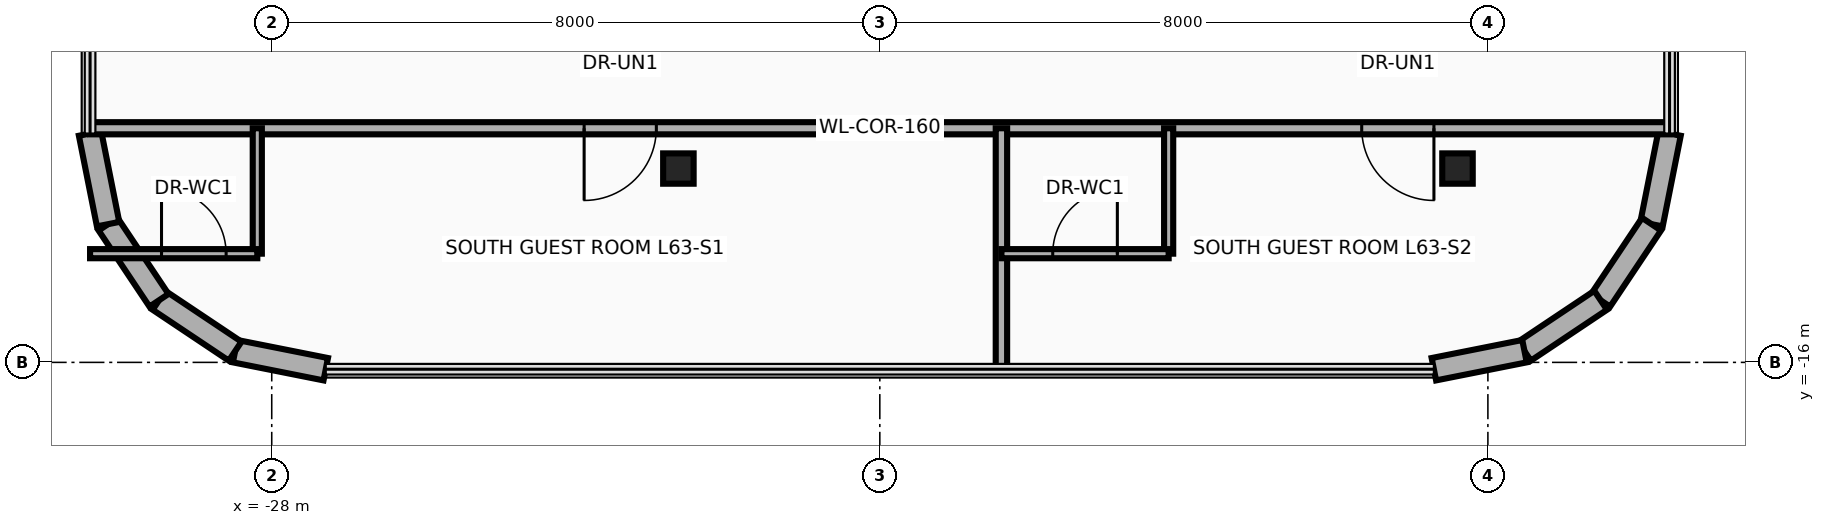
"""IFC4 building model, lengths in metres.
Left out: names, types, materials, properties, quantities, classifications, styles, units other than length and angle.
Written with IfcOpenShell. Run it as: python <this file> out.ifc"""

import sys

from ifc_helpers import new_model, si_unit, direction, frame, frame_2d, origin, origin_2d, place, context, subcontext, project, spatial, rectangle, i_section, extrude, source, transform, mapped, element, fill, save


model = new_model("IFC4")
c1 = context("Model", 3, precision=1e-05, world=origin(), true_north=direction((0.0, 1.0)))
c2 = subcontext(c1, "Body", "Model", "MODEL_VIEW")
j1 = project(units=[si_unit("LENGTHUNIT", "METRE"), si_unit("PLANEANGLEUNIT", "RADIAN")], contexts=[c1])
p1 = place(None, origin())
s1 = spatial("IfcSite", under=j1, at=p1, CompositionType="ELEMENT")
p2 = place(p1, origin())
s2 = spatial("IfcBuilding", under=s1, at=p2, CompositionType="ELEMENT")
p3 = place(p2, frame((0.0, 0.0, 244.0)))
s3 = spatial("IfcBuildingStorey", under=s2, at=p3, CompositionType="ELEMENT", Elevation=244.0)
m1 = source(origin(), c2, "Body", "SweptSolid", [
    extrude(i_section(OverallWidth=0.401, OverallDepth=0.399, WebThickness=0.025, FlangeThickness=0.04, at=origin_2d()), origin(), (0.0, 0.0, 1.0), 3.5),
])
for number, where, z_axis, x_axis in (
    (1, (-22.65, -13.45, 0.0), (0.0, 0.0, 1.0), (1.0, 0.0, 0.0)),
    (2, (-12.4, -13.45, 0.0), (0.0, 0.0, 1.0), (1.0, 0.0, 0.0)),
):
    element("IfcColumn", number, at=place(p3, frame(where, z_axis=z_axis, x_axis=x_axis)), inside=s3, PredefinedType="COLUMN", context=c2, shape_type="MappedRepresentation", body=[
        mapped(m1, transform((0.0, 0.0, 0.0), x_axis=(1.0, 0.0, 0.0), y_axis=(0.0, 1.0, 0.0), z_axis=(0.0, 0.0, 1.0), scale=1.0)),
    ])
p4 = place(p3, frame((-9.61, -12.989, 0.0), z_axis=(0.0, 0.0, 1.0), x_axis=(-0.194996050505, -0.980804027463, 0.0)))
e3 = element("IfcWall", 3, at=p4, inside=s3, PredefinedType="SOLIDWALL", context=c2, shape_type="SweptSolid", body=[
    extrude(rectangle(XDim=1.216, YDim=0.3, at=frame_2d((0.608, 0.0))), origin(), (0.0, 0.0, 1.0), 3.26),
])
for number, where, z_axis, x_axis in (
    (4, (-9.847, -14.182, 0.0), (0.0, 0.0, 1.0), (-0.556, -0.831, 0.0)),
    (5, (-10.517, -15.183, 0.0), (0.0, 0.0, 1.0), (-0.831, -0.556, 0.0)),
):
    element("IfcWall", number, at=place(p3, frame(where, z_axis=z_axis, x_axis=x_axis)), inside=s3, PredefinedType="SOLIDWALL", context=c2, shape_type="SweptSolid", body=[
        extrude(rectangle(XDim=1.205, YDim=0.3, at=frame_2d((0.603, 0.0))), origin(), (0.0, 0.0, 1.0), 3.26),
    ])
for number, where, z_axis, x_axis in (
    (6, (-11.518, -15.853, 0.0), (0.0, 0.0, 1.0), (-0.981, -0.195, 0.0)),
    (7, (-27.289, -16.09, 0.0), (0.0, 0.0, 1.0), (-0.981, 0.195, 0.0)),
):
    element("IfcWall", number, at=place(p3, frame(where, z_axis=z_axis, x_axis=x_axis)), inside=s3, PredefinedType="SOLIDWALL", context=c2, shape_type="SweptSolid", body=[
        extrude(rectangle(XDim=1.216, YDim=0.3, at=frame_2d((0.608, 0.0))), origin(), (0.0, 0.0, 1.0), 3.26),
    ])
for number, where, z_axis, x_axis in (
    (8, (-28.482, -15.853, 0.0), (0.0, 0.0, 1.0), (-0.831, 0.556, 0.0)),
    (9, (-29.483, -15.183, 0.0), (0.0, 0.0, 1.0), (-0.556, 0.831, 0.0)),
):
    element("IfcWall", number, at=place(p3, frame(where, z_axis=z_axis, x_axis=x_axis)), inside=s3, PredefinedType="SOLIDWALL", context=c2, shape_type="SweptSolid", body=[
        extrude(rectangle(XDim=1.205, YDim=0.3, at=frame_2d((0.603, 0.0))), origin(), (0.0, 0.0, 1.0), 3.26),
    ])
p5 = place(p3, frame((-30.153, -14.182, 0.0), z_axis=(0.0, 0.0, 1.0), x_axis=(-0.194996050505, 0.980804027463, 0.0)))
e10 = element("IfcWall", 10, at=p5, inside=s3, PredefinedType="SOLIDWALL", context=c2, shape_type="SweptSolid", body=[
    extrude(rectangle(XDim=1.216, YDim=0.3, at=frame_2d((0.608, 0.0))), origin(), (0.0, 0.0, 1.0), 3.26),
])
p6 = place(p3, frame((-30.39, -12.92, 0.0), z_axis=(0.0, 0.0, 1.0), x_axis=(1.0, 0.0, 0.0)))
e11 = element("IfcWall", 11, at=p6, inside=s3, PredefinedType="PARTITIONING", context=c2, shape_type="SweptSolid", body=[
    extrude(rectangle(XDim=20.78, YDim=0.16, at=frame_2d((10.39, 0.0))), origin(), (0.0, 0.0, 1.0), 2.634),
])
p7 = place(p6, frame((6.5, 0.0, 0.0)))
e12 = element("IfcOpeningElement", 12, at=p7, cuts=e11, PredefinedType="OPENING", context=c2, shape_type="SweptSolid", body=[
    extrude(rectangle(XDim=0.95, YDim=2.15, at=frame_2d((0.475, 1.075))), frame((0.0, 0.095, 0.0), z_axis=(0.0, -1.0, 0.0), x_axis=(1.0, 0.0, 0.0)), (0.0, 0.0, 1.0), 0.19),
])
p8 = place(p6, frame((16.73, 0.0, 0.0)))
e13 = element("IfcOpeningElement", 13, at=p8, cuts=e11, PredefinedType="OPENING", context=c2, shape_type="SweptSolid", body=[
    extrude(rectangle(XDim=0.95, YDim=2.15, at=frame_2d((0.475, 1.075))), frame((0.0, 0.095, 0.0), z_axis=(0.0, -1.0, 0.0), x_axis=(1.0, 0.0, 0.0)), (0.0, 0.0, 1.0), 0.19),
])
p9 = place(p3, frame((-18.4, -16.09, 0.0), z_axis=(0.0, 0.0, 1.0), x_axis=(0.0, 1.0, 0.0)))
e14 = element("IfcWall", 14, at=p9, inside=s3, PredefinedType="PARTITIONING", context=c2, shape_type="SweptSolid", body=[
    extrude(rectangle(XDim=3.17, YDim=0.15, at=frame_2d((1.585, 0.0))), origin(), (0.0, 0.0, 1.0), 2.706),
])
p10 = place(p3, frame((-28.19, -14.57, 0.0), z_axis=(0.0, 0.0, 1.0), x_axis=(0.0, 1.0, 0.0)))
e15 = element("IfcWall", 15, at=p10, inside=s3, PredefinedType="PARTITIONING", context=c2, shape_type="SweptSolid", body=[
    extrude(rectangle(XDim=1.65, YDim=0.12, at=frame_2d((0.825, 0.0))), origin(), (0.0, 0.0, 1.0), 3.26),
])
p11 = place(p3, frame((-30.39, -14.57, 0.0), z_axis=(0.0, 0.0, 1.0), x_axis=(1.0, 0.0, 0.0)))
e16 = element("IfcWall", 16, at=p11, inside=s3, PredefinedType="PARTITIONING", context=c2, shape_type="SweptSolid", body=[
    extrude(rectangle(XDim=2.2, YDim=0.12, at=frame_2d((1.1, 0.0))), origin(), (0.0, 0.0, 1.0), 3.26),
])
p12 = place(p11, frame((0.94, 0.0, 0.0)))
e17 = element("IfcOpeningElement", 17, at=p12, cuts=e16, PredefinedType="OPENING", context=c2, shape_type="SweptSolid", body=[
    extrude(rectangle(XDim=0.85, YDim=2.1, at=frame_2d((0.425, 1.05))), frame((0.0, 0.075, 0.0), z_axis=(0.0, -1.0, 0.0), x_axis=(1.0, 0.0, 0.0)), (0.0, 0.0, 1.0), 0.15),
])
p13 = place(p3, frame((-16.2, -14.57, 0.0), z_axis=(0.0, 0.0, 1.0), x_axis=(0.0, 1.0, 0.0)))
e18 = element("IfcWall", 18, at=p13, inside=s3, PredefinedType="PARTITIONING", context=c2, shape_type="SweptSolid", body=[
    extrude(rectangle(XDim=1.65, YDim=0.12, at=frame_2d((0.825, 0.0))), origin(), (0.0, 0.0, 1.0), 2.706),
])
p14 = place(p3, frame((-18.4, -14.57, 0.0), z_axis=(0.0, 0.0, 1.0), x_axis=(1.0, 0.0, 0.0)))
e19 = element("IfcWall", 19, at=p14, inside=s3, PredefinedType="PARTITIONING", context=c2, shape_type="SweptSolid", body=[
    extrude(rectangle(XDim=2.2, YDim=0.12, at=frame_2d((1.1, 0.0))), origin(), (0.0, 0.0, 1.0), 3.26),
])
p15 = place(p14, frame((0.675, 0.0, 0.0)))
e20 = element("IfcOpeningElement", 20, at=p15, cuts=e19, PredefinedType="OPENING", context=c2, shape_type="SweptSolid", body=[
    extrude(rectangle(XDim=0.85, YDim=2.1, at=frame_2d((0.425, 1.05))), frame((0.0, 0.075, 0.0), z_axis=(0.0, -1.0, 0.0), x_axis=(1.0, 0.0, 0.0)), (0.0, 0.0, 1.0), 0.15),
])
p16 = place(p7, frame((0.95, 0.0, 0.0), z_axis=(0.0, 0.0, 1.0), x_axis=(-1.0, 0.0, 0.0)))
e21 = element("IfcDoor", 21, at=p16, inside=s3, OperationType="SINGLE_SWING_LEFT", PredefinedType="DOOR", context=c2, shape_type="SweptSolid", body=[
    extrude(rectangle(XDim=0.95, YDim=2.15, at=frame_2d((0.475, 1.075))), frame((0.0, 0.025, 0.0), z_axis=(0.0, -1.0, 0.0), x_axis=(1.0, 0.0, 0.0)), (0.0, 0.0, 1.0), 0.05),
])
fill(e12, e21)
p17 = place(p12, origin())
e22 = element("IfcDoor", 22, at=p17, inside=s3, OperationType="SINGLE_SWING_RIGHT", PredefinedType="DOOR", context=c2, shape_type="SweptSolid", body=[
    extrude(rectangle(XDim=0.85, YDim=2.1, at=frame_2d((0.425, 1.05))), frame((0.0, 0.025, 0.0), z_axis=(0.0, -1.0, 0.0), x_axis=(1.0, 0.0, 0.0)), (0.0, 0.0, 1.0), 0.05),
])
fill(e17, e22)
p18 = place(p8, frame((0.95, 0.0, 0.0), z_axis=(0.0, 0.0, 1.0), x_axis=(-1.0, 0.0, 0.0)))
e23 = element("IfcDoor", 23, at=p18, inside=s3, OperationType="SINGLE_SWING_LEFT", PredefinedType="DOOR", context=c2, shape_type="SweptSolid", body=[
    extrude(rectangle(XDim=0.95, YDim=2.15, at=frame_2d((0.475, 1.075))), frame((0.0, 0.025, 0.0), z_axis=(0.0, -1.0, 0.0), x_axis=(1.0, 0.0, 0.0)), (0.0, 0.0, 1.0), 0.05),
])
fill(e13, e23)
p19 = place(p15, origin())
e24 = element("IfcDoor", 24, at=p19, inside=s3, OperationType="SINGLE_SWING_RIGHT", PredefinedType="DOOR", context=c2, shape_type="SweptSolid", body=[
    extrude(rectangle(XDim=0.85, YDim=2.1, at=frame_2d((0.425, 1.05))), frame((0.0, 0.025, 0.0), z_axis=(0.0, -1.0, 0.0), x_axis=(1.0, 0.0, 0.0)), (0.0, 0.0, 1.0), 0.05),
])
fill(e20, e24)
save(model, sys.argv[1])
